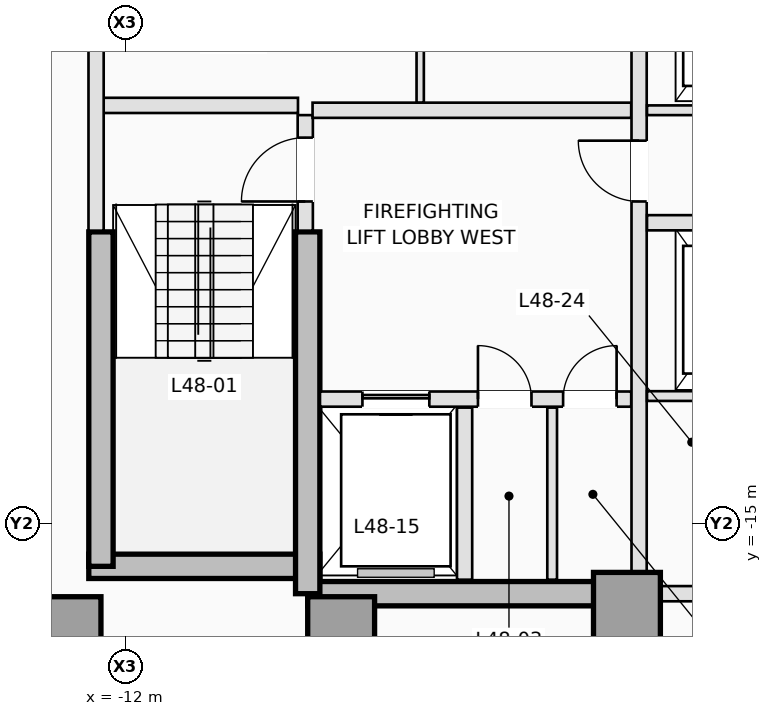
"""IFC4 building model, lengths in metres.
Left out: names, types, materials, properties, quantities, classifications, styles, units other than length and angle.
Written with IfcOpenShell. Run it as: python <this file> out.ifc"""

import sys

from ifc_helpers import new_model, si_unit, direction, frame, frame_2d, origin, origin_2d, place, context, subcontext, project, spatial, rectangle, extrude, element, fill, save


model = new_model("IFC4")
c1 = context("Model", 3, precision=1e-05, world=origin(), true_north=direction((0.0, 1.0)))
c2 = subcontext(c1, "Body", "Model", "MODEL_VIEW")
j1 = project(units=[si_unit("LENGTHUNIT", "METRE"), si_unit("PLANEANGLEUNIT", "RADIAN")], contexts=[c1])
p1 = place(None, origin())
s1 = spatial("IfcSite", under=j1, at=p1, CompositionType="ELEMENT")
p2 = place(p1, origin())
s2 = spatial("IfcBuilding", under=s1, at=p2, CompositionType="ELEMENT")
p3 = place(p2, frame((0.0, 0.0, 175.5)))
s3 = spatial("IfcBuildingStorey", under=s2, at=p3, CompositionType="ELEMENT", Elevation=175.5)
p4 = place(p3, frame((-12.6, -15.7, 0.0), z_axis=(0.0, 0.0, 1.0), x_axis=(1.0, 0.0, 0.0)))
e1 = element("IfcWall", 1, at=p4, inside=s3, PredefinedType="SHEAR", context=c2, shape_type="SweptSolid", body=[
    extrude(rectangle(XDim=3.8, YDim=0.4, at=frame_2d((1.9, 0.0))), origin(), (0.0, 0.0, 1.0), 3.5),
])
p5 = place(p3, frame((-9.0, -16.15, 0.0), z_axis=(0.0, 0.0, 1.0), x_axis=(1.0, 0.0, 0.0)))
e2 = element("IfcWall", 2, at=p5, inside=s3, PredefinedType="SHEAR", context=c2, shape_type="SweptSolid", body=[
    extrude(rectangle(XDim=5.25, YDim=0.4, at=frame_2d((2.625, 0.0))), origin(), (0.0, 0.0, 1.0), 3.5),
])
p6 = place(p3, frame((-12.4, -15.7, 0.0), z_axis=(0.0, 0.0, 1.0), x_axis=(0.0, 1.0, 0.0)))
e3 = element("IfcWall", 3, at=p6, inside=s3, PredefinedType="SHEAR", context=c2, shape_type="SweptSolid", body=[
    extrude(rectangle(XDim=5.5, YDim=0.4, at=frame_2d((2.75, 0.0))), origin(), (0.0, 0.0, 1.0), 3.5),
])
p7 = place(p3, frame((-9.0, -16.15, 0.0), z_axis=(0.0, 0.0, 1.0), x_axis=(0.0, 1.0, 0.0)))
e4 = element("IfcWall", 4, at=p7, inside=s3, PredefinedType="SHEAR", context=c2, shape_type="SweptSolid", body=[
    extrude(rectangle(XDim=5.95, YDim=0.4, at=frame_2d((2.975, 0.0))), origin(), (0.0, 0.0, 1.0), 3.5),
])
for number, where, z_axis, x_axis in (
    (5, (-12.95, -16.75, 0.0), (0.0, 0.0, 1.0), (1.0, 0.0, 0.0)),
    (6, (-8.45, -16.75, 0.0), (0.0, 0.0, 1.0), (1.0, 0.0, 0.0)),
    (7, (-3.75, -16.35, 0.0), (0.0, 0.0, 1.0), (1.0, 0.0, 0.0)),
):
    element("IfcColumn", number, at=place(p3, frame(where, z_axis=z_axis, x_axis=x_axis)), inside=s3, PredefinedType="COLUMN", context=c2, shape_type="SweptSolid", body=[
        extrude(rectangle(XDim=1.1, YDim=1.1, at=origin_2d()), origin(), (0.0, 0.0, 1.0), 3.5),
    ])
p8 = place(p3, frame((-9.04, -10.18, 0.0), z_axis=(0.0, 0.0, 1.0), x_axis=(0.0, 1.0, 0.0)))
e8 = element("IfcWall", 8, at=p8, inside=s3, PredefinedType="PARTITIONING", context=c2, shape_type="SweptSolid", body=[
    extrude(rectangle(XDim=1.9, YDim=0.25, at=frame_2d((0.95, 0.0))), origin(), (0.0, 0.0, 1.0), 3.14),
])
p9 = place(p8, frame((0.48, 0.0, 0.0)))
e9 = element("IfcOpeningElement", 9, at=p9, cuts=e8, PredefinedType="OPENING", context=c2, shape_type="SweptSolid", body=[
    extrude(rectangle(XDim=1.05, YDim=2.15, at=frame_2d((0.525, 1.075))), frame((0.0, 0.135, 0.0), z_axis=(0.0, -1.0, 0.0), x_axis=(1.0, 0.0, 0.0)), (0.0, 0.0, 1.0), 0.27),
])
p10 = place(p3, frame((-12.38, -8.12, 0.0), z_axis=(0.0, 0.0, 1.0), x_axis=(1.0, 0.0, 0.0)))
e10 = element("IfcWall", 10, at=p10, inside=s3, PredefinedType="PARTITIONING", context=c2, shape_type="SweptSolid", body=[
    extrude(rectangle(XDim=3.22, YDim=0.25, at=frame_2d((1.61, 0.0))), origin(), (0.0, 0.0, 1.0), 3.14),
])
p11 = place(p3, frame((-12.48, -10.18, 0.0), z_axis=(0.0, 0.0, 1.0), x_axis=(0.0, 1.0, 0.0)))
e11 = element("IfcWall", 11, at=p11, inside=s3, PredefinedType="PARTITIONING", context=c2, shape_type="SweptSolid", body=[
    extrude(rectangle(XDim=4.828, YDim=0.25, at=frame_2d((2.414, 0.0))), origin(), (0.0, 0.0, 1.0), 3.14),
])
p12 = place(p3, frame((-8.798, -12.95, 0.0), z_axis=(0.0, 0.0, 1.0), x_axis=(1.0, 0.0, 0.0)))
e12 = element("IfcWall", 12, at=p12, inside=s3, PredefinedType="PARTITIONING", context=c2, shape_type="SweptSolid", body=[
    extrude(rectangle(XDim=5.118, YDim=0.25, at=frame_2d((2.559, 0.0))), origin(), (0.0, 0.0, 1.0), 3.14),
])
p13 = place(p12, frame((0.698, 0.0, 0.0)))
e13 = element("IfcOpeningElement", 13, at=p13, cuts=e12, PredefinedType="OPENING", context=c2, shape_type="SweptSolid", body=[
    extrude(rectangle(XDim=1.1, YDim=2.15, at=frame_2d((0.55, 1.075))), frame((0.0, 0.135, 0.0), z_axis=(0.0, -1.0, 0.0), x_axis=(1.0, 0.0, 0.0)), (0.0, 0.0, 1.0), 0.27),
])
p14 = place(p12, frame((2.598, 0.0, 0.0)))
e14 = element("IfcOpeningElement", 14, at=p14, cuts=e12, PredefinedType="OPENING", context=c2, shape_type="SweptSolid", body=[
    extrude(rectangle(XDim=0.88, YDim=2.1, at=frame_2d((0.44, 1.05))), frame((0.0, 0.135, 0.0), z_axis=(0.0, -1.0, 0.0), x_axis=(1.0, 0.0, 0.0)), (0.0, 0.0, 1.0), 0.27),
])
p15 = place(p12, frame((3.998, 0.0, 0.0)))
e15 = element("IfcOpeningElement", 15, at=p15, cuts=e12, PredefinedType="OPENING", context=c2, shape_type="SweptSolid", body=[
    extrude(rectangle(XDim=0.88, YDim=2.1, at=frame_2d((0.44, 1.05))), frame((0.0, 0.135, 0.0), z_axis=(0.0, -1.0, 0.0), x_axis=(1.0, 0.0, 0.0)), (0.0, 0.0, 1.0), 0.27),
])
p16 = place(p3, frame((-6.42, -15.92, 0.0), z_axis=(0.0, 0.0, 1.0), x_axis=(0.0, 1.0, 0.0)))
e16 = element("IfcWall", 16, at=p16, inside=s3, PredefinedType="PARTITIONING", context=c2, shape_type="SweptSolid", body=[
    extrude(rectangle(XDim=2.83, YDim=0.25, at=frame_2d((1.415, 0.0))), origin(), (0.0, 0.0, 1.0), 3.14),
])
p17 = place(p3, frame((-4.98, -15.92, 0.0), z_axis=(0.0, 0.0, 1.0), x_axis=(0.0, 1.0, 0.0)))
e17 = element("IfcWall", 17, at=p17, inside=s3, PredefinedType="PARTITIONING", context=c2, shape_type="SweptSolid", body=[
    extrude(rectangle(XDim=2.83, YDim=0.16, at=frame_2d((1.415, 0.0))), origin(), (0.0, 0.0, 1.0), 3.14),
])
p18 = place(p3, frame((-8.92, -8.2, 0.0), z_axis=(0.0, 0.0, 1.0), x_axis=(1.0, 0.0, 0.0)))
e18 = element("IfcWall", 18, at=p18, inside=s3, PredefinedType="PARTITIONING", context=c2, shape_type="SweptSolid", body=[
    extrude(rectangle(XDim=5.24, YDim=0.25, at=frame_2d((2.62, 0.0))), origin(), (0.0, 0.0, 1.0), 3.14),
])
p19 = place(p3, frame((-3.55, -15.798, 0.0), z_axis=(0.0, 0.0, 1.0), x_axis=(0.0, 1.0, 0.0)))
e19 = element("IfcWall", 19, at=p19, inside=s3, PredefinedType="PARTITIONING", context=c2, shape_type="SweptSolid", body=[
    extrude(rectangle(XDim=10.446, YDim=0.25, at=frame_2d((5.223, 0.0))), origin(), (0.0, 0.0, 1.0), 3.14),
])
p20 = place(p19, frame((6.098, 0.0, 0.0)))
e20 = element("IfcOpeningElement", 20, at=p20, cuts=e19, PredefinedType="OPENING", context=c2, shape_type="SweptSolid", body=[
    extrude(rectangle(XDim=1.0, YDim=2.15, at=frame_2d((0.5, 1.075))), frame((0.0, 0.135, 0.0), z_axis=(0.0, -1.0, 0.0), x_axis=(1.0, 0.0, 0.0)), (0.0, 0.0, 1.0), 0.27),
])
p21 = place(p3, frame((-7.15, -8.073, 0.0), z_axis=(0.0, 0.0, 1.0), x_axis=(0.0, 1.0, 0.0)))
e21 = element("IfcWall", 21, at=p21, inside=s3, PredefinedType="PARTITIONING", context=c2, shape_type="SweptSolid", body=[
    extrude(rectangle(XDim=2.733, YDim=0.12, at=frame_2d((1.366, 0.0))), origin(), (0.0, 0.0, 1.0), 3.14),
])
p22 = place(p3, frame((-3.198, -16.15, 0.0), z_axis=(0.0, 0.0, 1.0), x_axis=(1.0, 0.0, 0.0)))
e22 = element("IfcWall", 22, at=p22, inside=s3, PredefinedType="PARTITIONING", context=c2, shape_type="SweptSolid", body=[
    extrude(rectangle(XDim=6.396, YDim=0.25, at=frame_2d((3.198, 0.0))), origin(), (0.0, 0.0, 1.0), 2.34),
])
p23 = place(p3, frame((-3.42, -8.2, 0.0), z_axis=(0.0, 0.0, 1.0), x_axis=(1.0, 0.0, 0.0)))
e23 = element("IfcWall", 23, at=p23, inside=s3, PredefinedType="PARTITIONING", context=c2, shape_type="SweptSolid", body=[
    extrude(rectangle(XDim=2.47, YDim=0.16, at=frame_2d((1.235, 0.0))), origin(), (0.0, 0.0, 1.0), 3.14),
])
p24 = place(p3, frame((-3.42, -10.05, 0.0), z_axis=(0.0, 0.0, 1.0), x_axis=(1.0, 0.0, 0.0)))
e24 = element("IfcWall", 24, at=p24, inside=s3, PredefinedType="PARTITIONING", context=c2, shape_type="SweptSolid", body=[
    extrude(rectangle(XDim=2.47, YDim=0.25, at=frame_2d((1.235, 0.0))), origin(), (0.0, 0.0, 1.0), 3.14),
])
p25 = place(p24, frame((0.92, 0.0, 0.0)))
e25 = element("IfcOpeningElement", 25, at=p25, cuts=e24, PredefinedType="OPENING", context=c2, shape_type="SweptSolid", body=[
    extrude(rectangle(XDim=1.0, YDim=2.15, at=frame_2d((0.5, 1.075))), frame((0.0, 0.135, 0.0), z_axis=(0.0, -1.0, 0.0), x_axis=(1.0, 0.0, 0.0)), (0.0, 0.0, 1.0), 0.27),
])
p26 = place(p3, frame((-3.42, -12.9, 0.0), z_axis=(0.0, 0.0, 1.0), x_axis=(1.0, 0.0, 0.0)))
e26 = element("IfcWall", 26, at=p26, inside=s3, PredefinedType="PARTITIONING", context=c2, shape_type="SweptSolid", body=[
    extrude(rectangle(XDim=6.84, YDim=0.16, at=frame_2d((3.42, 0.0))), origin(), (0.0, 0.0, 1.0), 3.14),
])
p27 = place(p26, frame((2.98, 0.0, 0.0)))
e27 = element("IfcOpeningElement", 27, at=p27, cuts=e26, PredefinedType="OPENING", context=c2, shape_type="SweptSolid", body=[
    extrude(rectangle(XDim=0.88, YDim=2.12, at=frame_2d((0.44, 1.06))), frame((0.0, 0.09, 0.0), z_axis=(0.0, -1.0, 0.0), x_axis=(1.0, 0.0, 0.0)), (0.0, 0.0, 1.0), 0.18),
])
p28 = place(p13, origin())
e28 = element("IfcDoor", 28, at=p28, inside=s3, OperationType="SLIDING_TO_LEFT", PredefinedType="DOOR", context=c2, shape_type="SweptSolid", body=[
    extrude(rectangle(XDim=1.1, YDim=2.15, at=frame_2d((0.55, 1.075))), frame((0.0, 0.025, 0.0), z_axis=(0.0, -1.0, 0.0), x_axis=(1.0, 0.0, 0.0)), (0.0, 0.0, 1.0), 0.05),
])
fill(e13, e28)
p29 = place(p9, origin())
e29 = element("IfcDoor", 29, at=p29, inside=s3, OperationType="SINGLE_SWING_LEFT", PredefinedType="DOOR", context=c2, shape_type="SweptSolid", body=[
    extrude(rectangle(XDim=1.05, YDim=2.15, at=frame_2d((0.525, 1.075))), frame((0.0, 0.025, 0.0), z_axis=(0.0, -1.0, 0.0), x_axis=(1.0, 0.0, 0.0)), (0.0, 0.0, 1.0), 0.05),
])
fill(e9, e29)
p30 = place(p14, origin())
e30 = element("IfcDoor", 30, at=p30, inside=s3, OperationType="SINGLE_SWING_LEFT", PredefinedType="TRAPDOOR", context=c2, shape_type="SweptSolid", body=[
    extrude(rectangle(XDim=0.88, YDim=2.1, at=frame_2d((0.44, 1.05))), frame((0.0, 0.025, 0.0), z_axis=(0.0, -1.0, 0.0), x_axis=(1.0, 0.0, 0.0)), (0.0, 0.0, 1.0), 0.05),
])
fill(e14, e30)
p31 = place(p15, origin())
e31 = element("IfcDoor", 31, at=p31, inside=s3, OperationType="SINGLE_SWING_RIGHT", PredefinedType="TRAPDOOR", context=c2, shape_type="SweptSolid", body=[
    extrude(rectangle(XDim=0.88, YDim=2.1, at=frame_2d((0.44, 1.05))), frame((0.0, 0.025, 0.0), z_axis=(0.0, -1.0, 0.0), x_axis=(1.0, 0.0, 0.0)), (0.0, 0.0, 1.0), 0.05),
])
fill(e15, e31)
p32 = place(p20, origin())
e32 = element("IfcDoor", 32, at=p32, inside=s3, OperationType="SINGLE_SWING_RIGHT", PredefinedType="DOOR", context=c2, shape_type="SweptSolid", body=[
    extrude(rectangle(XDim=1.0, YDim=2.15, at=frame_2d((0.5, 1.075))), frame((0.0, 0.025, 0.0), z_axis=(0.0, -1.0, 0.0), x_axis=(1.0, 0.0, 0.0)), (0.0, 0.0, 1.0), 0.05),
])
fill(e20, e32)
save(model, sys.argv[1])
